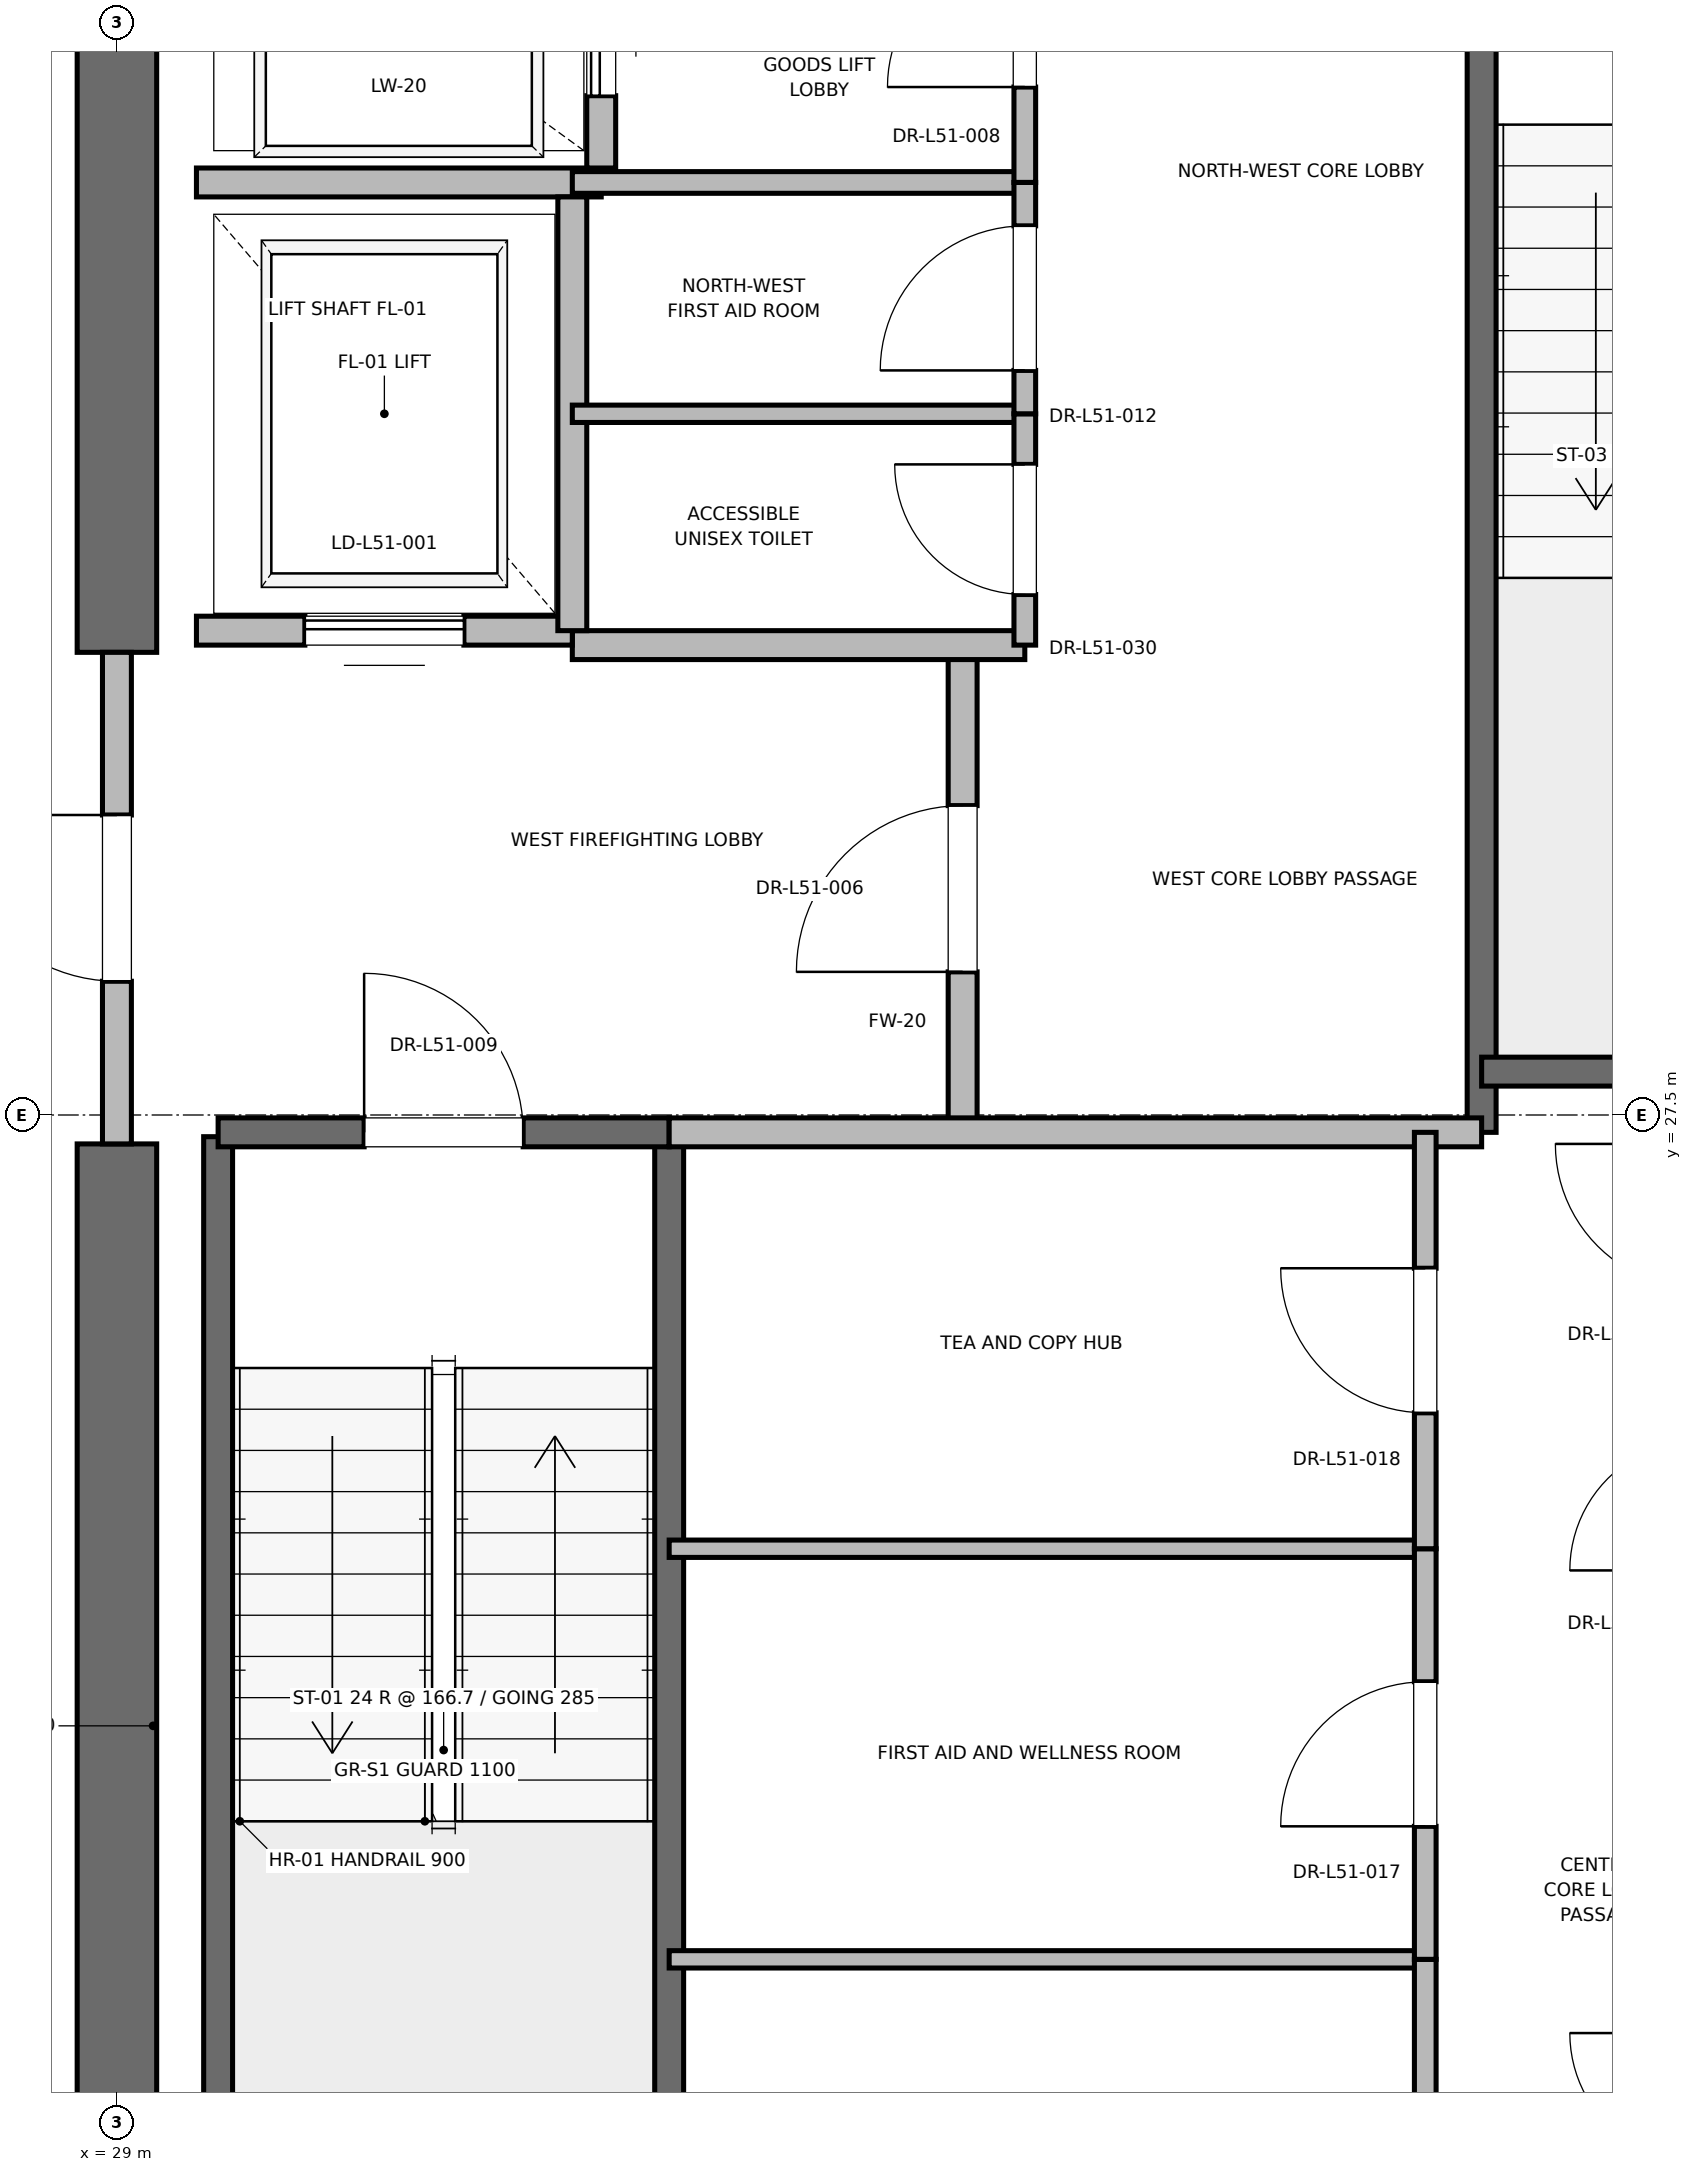
"""IFC4 building model, lengths in metres.
Left out: names, types, materials, properties, quantities, classifications, styles, units other than length and angle.
Written with IfcOpenShell. Run it as: python <this file> out.ifc"""

import sys

from ifc_helpers import new_model, si_unit, direction, frame, frame_2d, origin, place, context, subcontext, project, spatial, rectangle, extrude, element, fill, save


model = new_model("IFC4")
c1 = context("Model", 3, precision=1e-05, world=origin(), true_north=direction((0.0, 1.0)))
c2 = subcontext(c1, "Body", "Model", "MODEL_VIEW")
j1 = project(units=[si_unit("LENGTHUNIT", "METRE"), si_unit("PLANEANGLEUNIT", "RADIAN")], contexts=[c1])
p1 = place(None, origin())
s1 = spatial("IfcSite", under=j1, at=p1, CompositionType="ELEMENT")
p2 = place(p1, origin())
s2 = spatial("IfcBuilding", under=s1, at=p2, CompositionType="ELEMENT")
p3 = place(p2, frame((0.0, 0.0, 221.2)))
s3 = spatial("IfcBuildingStorey", under=s2, at=p3, CompositionType="ELEMENT", Elevation=221.2)
p4 = place(p3, frame((29.0, 18.5, 0.0), z_axis=(0.0, 0.0, 1.0), x_axis=(0.0, 1.0, 0.0)))
e1 = element("IfcWall", 1, at=p4, inside=s3, PredefinedType="SHEAR", context=c2, shape_type="SweptSolid", body=[
    extrude(rectangle(XDim=8.8, YDim=0.55, at=frame_2d((4.4, 0.0))), origin(), (0.0, 0.0, 1.0), 3.775),
])
p5 = place(p3, frame((29.0, 30.7, 0.0), z_axis=(0.0, 0.0, 1.0), x_axis=(0.0, 1.0, 0.0)))
e2 = element("IfcWall", 2, at=p5, inside=s3, PredefinedType="SHEAR", context=c2, shape_type="SweptSolid", body=[
    extrude(rectangle(XDim=5.8, YDim=0.55, at=frame_2d((2.9, 0.0))), origin(), (0.0, 0.0, 1.0), 3.775),
])
p6 = place(p3, frame((29.7, 19.2, 0.0), z_axis=(0.0, 0.0, 1.0), x_axis=(0.0, 1.0, 0.0)))
e3 = element("IfcWall", 3, at=p6, inside=s3, PredefinedType="SOLIDWALL", context=c2, shape_type="SweptSolid", body=[
    extrude(rectangle(XDim=8.15, YDim=0.2, at=frame_2d((4.075, 0.0))), origin(), (0.0, 0.0, 1.0), 3.775),
])
p7 = place(p3, frame((32.82, 18.6, 0.0), z_axis=(0.0, 0.0, 1.0), x_axis=(0.0, 1.0, 0.0)))
e4 = element("IfcWall", 4, at=p7, inside=s3, PredefinedType="SOLIDWALL", context=c2, shape_type="SweptSolid", body=[
    extrude(rectangle(XDim=8.78, YDim=0.2, at=frame_2d((4.39, 0.0))), origin(), (0.0, 0.0, 1.0), 3.775),
])
p8 = place(p3, frame((29.7, 27.38, 0.0), z_axis=(0.0, 0.0, 1.0), x_axis=(1.0, 0.0, 0.0)))
e5 = element("IfcWall", 5, at=p8, inside=s3, PredefinedType="SOLIDWALL", context=c2, shape_type="SweptSolid", body=[
    extrude(rectangle(XDim=3.12, YDim=0.2, at=frame_2d((1.56, 0.0))), origin(), (0.0, 0.0, 1.0), 3.775),
])
p9 = place(p8, frame((1.01, 0.0, 0.0)))
e6 = element("IfcOpeningElement", 6, at=p9, cuts=e5, PredefinedType="OPENING", context=c2, shape_type="SweptSolid", body=[
    extrude(rectangle(XDim=1.1, YDim=2.15, at=frame_2d((0.55, 1.075))), frame((0.0, 0.1, 0.0), z_axis=(0.0, -1.0, 0.0), x_axis=(1.0, 0.0, 0.0)), (0.0, 0.0, 1.0), 0.2),
])
p10 = place(p3, frame((38.44, 27.38, 0.0), z_axis=(0.0, 0.0, 1.0), x_axis=(0.0, 1.0, 0.0)))
e7 = element("IfcWall", 7, at=p10, inside=s3, PredefinedType="SOLIDWALL", context=c2, shape_type="SweptSolid", body=[
    extrude(rectangle(XDim=8.87, YDim=0.2, at=frame_2d((4.435, 0.0))), origin(), (0.0, 0.0, 1.0), 3.775),
])
p11 = place(p3, frame((38.44, 27.8, 0.0), z_axis=(0.0, 0.0, 1.0), x_axis=(1.0, 0.0, 0.0)))
e8 = element("IfcWall", 8, at=p11, inside=s3, PredefinedType="SOLIDWALL", context=c2, shape_type="SweptSolid", body=[
    extrude(rectangle(XDim=3.32, YDim=0.2, at=frame_2d((1.66, 0.0))), origin(), (0.0, 0.0, 1.0), 3.775),
])
p12 = place(p3, frame((34.85, 27.38, 0.0), z_axis=(0.0, 0.0, 1.0), x_axis=(0.0, 1.0, 0.0)))
e9 = element("IfcWall", 9, at=p12, inside=s3, PredefinedType="PARTITIONING", context=c2, shape_type="SweptSolid", body=[
    extrude(rectangle(XDim=3.37, YDim=0.2, at=frame_2d((1.685, 0.0))), origin(), (0.0, 0.0, 1.0), 3.775),
])
p13 = place(p12, frame((1.11, 0.0, 0.0)))
e10 = element("IfcOpeningElement", 10, at=p13, cuts=e9, PredefinedType="OPENING", context=c2, shape_type="SweptSolid", body=[
    extrude(rectangle(XDim=1.15, YDim=2.2, at=frame_2d((0.575, 1.1))), frame((0.0, 0.1, 0.0), z_axis=(0.0, -1.0, 0.0), x_axis=(1.0, 0.0, 0.0)), (0.0, 0.0, 1.0), 0.2),
])
p14 = place(p3, frame((29.0, 27.3, 0.0), z_axis=(0.0, 0.0, 1.0), x_axis=(0.0, 1.0, 0.0)))
e11 = element("IfcWall", 11, at=p14, inside=s3, PredefinedType="PARTITIONING", context=c2, shape_type="SweptSolid", body=[
    extrude(rectangle(XDim=3.4, YDim=0.2, at=frame_2d((1.7, 0.0))), origin(), (0.0, 0.0, 1.0), 2.755),
])
p15 = place(p14, frame((1.125, 0.0, 0.0)))
e12 = element("IfcOpeningElement", 12, at=p15, cuts=e11, PredefinedType="OPENING", context=c2, shape_type="SweptSolid", body=[
    extrude(rectangle(XDim=1.15, YDim=2.2, at=frame_2d((0.575, 1.1))), frame((0.0, 0.1, 0.0), z_axis=(0.0, -1.0, 0.0), x_axis=(1.0, 0.0, 0.0)), (0.0, 0.0, 1.0), 0.2),
])
p16 = place(p3, frame((32.82, 27.38, 0.0), z_axis=(0.0, 0.0, 1.0), x_axis=(1.0, 0.0, 0.0)))
e13 = element("IfcWall", 13, at=p16, inside=s3, PredefinedType="PARTITIONING", context=c2, shape_type="SweptSolid", body=[
    extrude(rectangle(XDim=5.62, YDim=0.2, at=frame_2d((2.81, 0.0))), origin(), (0.0, 0.0, 1.0), 3.775),
])
p17 = place(p3, frame((32.15, 30.75, 0.0), z_axis=(0.0, 0.0, 1.0), x_axis=(1.0, 0.0, 0.0)))
e14 = element("IfcWall", 14, at=p17, inside=s3, PredefinedType="PARTITIONING", context=c2, shape_type="SweptSolid", body=[
    extrude(rectangle(XDim=3.13, YDim=0.2, at=frame_2d((1.565, 0.0))), origin(), (0.0, 0.0, 1.0), 3.775),
])
p18 = place(p3, frame((29.55, 30.85, 0.0), z_axis=(0.0, 0.0, 1.0), x_axis=(1.0, 0.0, 0.0)))
e15 = element("IfcWall", 15, at=p18, inside=s3, PredefinedType="SOLIDWALL", context=c2, shape_type="SweptSolid", body=[
    extrude(rectangle(XDim=2.6, YDim=0.2, at=frame_2d((1.3, 0.0))), origin(), (0.0, 0.0, 1.0), 2.755),
])
p19 = place(p18, frame((0.75, 0.0, 0.0)))
e16 = element("IfcOpeningElement", 16, at=p19, cuts=e15, PredefinedType="OPENING", context=c2, shape_type="SweptSolid", body=[
    extrude(rectangle(XDim=1.1, YDim=2.2, at=frame_2d((0.55, 1.1))), frame((0.0, 0.1, 0.0), z_axis=(0.0, -1.0, 0.0), x_axis=(1.0, 0.0, 0.0)), (0.0, 0.0, 1.0), 0.2),
])
p20 = place(p3, frame((29.55, 33.95, 0.0), z_axis=(0.0, 0.0, 1.0), x_axis=(1.0, 0.0, 0.0)))
e17 = element("IfcWall", 17, at=p20, inside=s3, PredefinedType="SOLIDWALL", context=c2, shape_type="SweptSolid", body=[
    extrude(rectangle(XDim=2.8, YDim=0.2, at=frame_2d((1.4, 0.0))), origin(), (0.0, 0.0, 1.0), 3.775),
])
p21 = place(p3, frame((32.15, 30.85, 0.0), z_axis=(0.0, 0.0, 1.0), x_axis=(0.0, 1.0, 0.0)))
e18 = element("IfcWall", 18, at=p21, inside=s3, PredefinedType="SOLIDWALL", context=c2, shape_type="SweptSolid", body=[
    extrude(rectangle(XDim=3.0, YDim=0.2, at=frame_2d((1.5, 0.0))), origin(), (0.0, 0.0, 1.0), 3.775),
])
p22 = place(p3, frame((32.35, 34.05, 0.0), z_axis=(0.0, 0.0, 1.0), x_axis=(0.0, 1.0, 0.0)))
e19 = element("IfcWall", 19, at=p22, inside=s3, PredefinedType="SOLIDWALL", context=c2, shape_type="SweptSolid", body=[
    extrude(rectangle(XDim=2.1, YDim=0.2, at=frame_2d((1.05, 0.0))), origin(), (0.0, 0.0, 1.0), 3.775),
])
p23 = place(p22, frame((0.5, 0.0, 0.0)))
e20 = element("IfcOpeningElement", 20, at=p23, cuts=e19, PredefinedType="OPENING", context=c2, shape_type="SweptSolid", body=[
    extrude(rectangle(XDim=1.1, YDim=2.2, at=frame_2d((0.55, 1.1))), frame((0.0, 0.1, 0.0), z_axis=(0.0, -1.0, 0.0), x_axis=(1.0, 0.0, 0.0)), (0.0, 0.0, 1.0), 0.2),
])
p24 = place(p3, frame((32.15, 33.95, 0.0), z_axis=(0.0, 0.0, 1.0), x_axis=(1.0, 0.0, 0.0)))
e21 = element("IfcWall", 21, at=p24, inside=s3, PredefinedType="PARTITIONING", context=c2, shape_type="SweptSolid", body=[
    extrude(rectangle(XDim=3.13, YDim=0.15, at=frame_2d((1.565, 0.0))), origin(), (0.0, 0.0, 1.0), 2.85),
])
p25 = place(p3, frame((35.28, 33.95, 0.0), z_axis=(0.0, 0.0, 1.0), x_axis=(0.0, 1.0, 0.0)))
e22 = element("IfcWall", 22, at=p25, inside=s3, PredefinedType="PARTITIONING", context=c2, shape_type="SweptSolid", body=[
    extrude(rectangle(XDim=2.27, YDim=0.15, at=frame_2d((1.135, 0.0))), origin(), (0.0, 0.0, 1.0), 2.755),
])
p26 = place(p25, frame((0.66, 0.0, 0.0)))
e23 = element("IfcOpeningElement", 23, at=p26, cuts=e22, PredefinedType="OPENING", context=c2, shape_type="SweptSolid", body=[
    extrude(rectangle(XDim=0.95, YDim=2.15, at=frame_2d((0.475, 1.075))), frame((0.0, 0.075, 0.0), z_axis=(0.0, -1.0, 0.0), x_axis=(1.0, 0.0, 0.0)), (0.0, 0.0, 1.0), 0.15),
])
p27 = place(p3, frame((32.15, 32.35, 0.0), z_axis=(0.0, 0.0, 1.0), x_axis=(1.0, 0.0, 0.0)))
e24 = element("IfcWall", 24, at=p27, inside=s3, PredefinedType="PARTITIONING", context=c2, shape_type="SweptSolid", body=[
    extrude(rectangle(XDim=3.13, YDim=0.12, at=frame_2d((1.565, 0.0))), origin(), (0.0, 0.0, 1.0), 2.85),
])
p28 = place(p3, frame((35.28, 30.75, 0.0), z_axis=(0.0, 0.0, 1.0), x_axis=(0.0, 1.0, 0.0)))
e25 = element("IfcWall", 25, at=p28, inside=s3, PredefinedType="PARTITIONING", context=c2, shape_type="SweptSolid", body=[
    extrude(rectangle(XDim=1.6, YDim=0.15, at=frame_2d((0.8, 0.0))), origin(), (0.0, 0.0, 1.0), 2.85),
])
p29 = place(p28, frame((0.35, 0.0, 0.0)))
e26 = element("IfcOpeningElement", 26, at=p29, cuts=e25, PredefinedType="OPENING", context=c2, shape_type="SweptSolid", body=[
    extrude(rectangle(XDim=0.9, YDim=2.1, at=frame_2d((0.45, 1.05))), frame((0.0, 0.075, 0.0), z_axis=(0.0, -1.0, 0.0), x_axis=(1.0, 0.0, 0.0)), (0.0, 0.0, 1.0), 0.15),
])
p30 = place(p3, frame((35.28, 32.35, 0.0), z_axis=(0.0, 0.0, 1.0), x_axis=(0.0, 1.0, 0.0)))
e27 = element("IfcWall", 27, at=p30, inside=s3, PredefinedType="PARTITIONING", context=c2, shape_type="SweptSolid", body=[
    extrude(rectangle(XDim=1.6, YDim=0.15, at=frame_2d((0.8, 0.0))), origin(), (0.0, 0.0, 1.0), 2.85),
])
p31 = place(p30, frame((0.3, 0.0, 0.0)))
e28 = element("IfcOpeningElement", 28, at=p31, cuts=e27, PredefinedType="OPENING", context=c2, shape_type="SweptSolid", body=[
    extrude(rectangle(XDim=1.0, YDim=2.15, at=frame_2d((0.5, 1.075))), frame((0.0, 0.075, 0.0), z_axis=(0.0, -1.0, 0.0), x_axis=(1.0, 0.0, 0.0)), (0.0, 0.0, 1.0), 0.15),
])
for number, where, z_axis, x_axis in (
    (29, (32.82, 21.66, 0.0), (0.0, 0.0, 1.0), (1.0, 0.0, 0.0)),
    (30, (32.82, 24.5, 0.0), (0.0, 0.0, 1.0), (1.0, 0.0, 0.0)),
):
    element("IfcWall", number, at=place(p3, frame(where, z_axis=z_axis, x_axis=x_axis)), inside=s3, PredefinedType="PARTITIONING", context=c2, shape_type="SweptSolid", body=[
        extrude(rectangle(XDim=5.23, YDim=0.12, at=frame_2d((2.615, 0.0))), origin(), (0.0, 0.0, 1.0), 2.85),
    ])
p32 = place(p3, frame((38.05, 18.6, 0.0), z_axis=(0.0, 0.0, 1.0), x_axis=(0.0, 1.0, 0.0)))
e31 = element("IfcWall", 31, at=p32, inside=s3, PredefinedType="PARTITIONING", context=c2, shape_type="SweptSolid", body=[
    extrude(rectangle(XDim=3.06, YDim=0.15, at=frame_2d((1.53, 0.0))), origin(), (0.0, 0.0, 1.0), 2.755),
])
p33 = place(p32, frame((1.03, 0.0, 0.0)))
e32 = element("IfcOpeningElement", 32, at=p33, cuts=e31, PredefinedType="OPENING", context=c2, shape_type="SweptSolid", body=[
    extrude(rectangle(XDim=1.0, YDim=2.15, at=frame_2d((0.5, 1.075))), frame((0.0, 0.075, 0.0), z_axis=(0.0, -1.0, 0.0), x_axis=(1.0, 0.0, 0.0)), (0.0, 0.0, 1.0), 0.15),
])
p34 = place(p3, frame((38.05, 21.66, 0.0), z_axis=(0.0, 0.0, 1.0), x_axis=(0.0, 1.0, 0.0)))
e33 = element("IfcWall", 33, at=p34, inside=s3, PredefinedType="PARTITIONING", context=c2, shape_type="SweptSolid", body=[
    extrude(rectangle(XDim=2.84, YDim=0.15, at=frame_2d((1.42, 0.0))), origin(), (0.0, 0.0, 1.0), 2.85),
])
p35 = place(p34, frame((0.92, 0.0, 0.0)))
e34 = element("IfcOpeningElement", 34, at=p35, cuts=e33, PredefinedType="OPENING", context=c2, shape_type="SweptSolid", body=[
    extrude(rectangle(XDim=1.0, YDim=2.15, at=frame_2d((0.5, 1.075))), frame((0.0, 0.075, 0.0), z_axis=(0.0, -1.0, 0.0), x_axis=(1.0, 0.0, 0.0)), (0.0, 0.0, 1.0), 0.15),
])
p36 = place(p3, frame((38.05, 24.5, 0.0), z_axis=(0.0, 0.0, 1.0), x_axis=(0.0, 1.0, 0.0)))
e35 = element("IfcWall", 35, at=p36, inside=s3, PredefinedType="PARTITIONING", context=c2, shape_type="SweptSolid", body=[
    extrude(rectangle(XDim=2.88, YDim=0.15, at=frame_2d((1.44, 0.0))), origin(), (0.0, 0.0, 1.0), 2.85),
])
p37 = place(p36, frame((0.94, 0.0, 0.0)))
e36 = element("IfcOpeningElement", 36, at=p37, cuts=e35, PredefinedType="OPENING", context=c2, shape_type="SweptSolid", body=[
    extrude(rectangle(XDim=1.0, YDim=2.15, at=frame_2d((0.5, 1.075))), frame((0.0, 0.075, 0.0), z_axis=(0.0, -1.0, 0.0), x_axis=(1.0, 0.0, 0.0)), (0.0, 0.0, 1.0), 0.15),
])
p38 = place(p9, origin())
e37 = element("IfcDoor", 37, at=p38, inside=s3, OperationType="SINGLE_SWING_LEFT", PredefinedType="DOOR", context=c2, shape_type="SweptSolid", body=[
    extrude(rectangle(XDim=1.1, YDim=2.15, at=frame_2d((0.55, 1.075))), frame((0.0, 0.025, 0.0), z_axis=(0.0, -1.0, 0.0), x_axis=(1.0, 0.0, 0.0)), (0.0, 0.0, 1.0), 0.05),
])
fill(e6, e37)
p39 = place(p13, origin())
e38 = element("IfcDoor", 38, at=p39, inside=s3, OperationType="SINGLE_SWING_LEFT", PredefinedType="DOOR", context=c2, shape_type="SweptSolid", body=[
    extrude(rectangle(XDim=1.15, YDim=2.2, at=frame_2d((0.575, 1.1))), frame((0.0, 0.025, 0.0), z_axis=(0.0, -1.0, 0.0), x_axis=(1.0, 0.0, 0.0)), (0.0, 0.0, 1.0), 0.05),
])
fill(e10, e38)
p40 = place(p15, origin())
e39 = element("IfcDoor", 39, at=p40, inside=s3, OperationType="SINGLE_SWING_RIGHT", PredefinedType="DOOR", context=c2, shape_type="SweptSolid", body=[
    extrude(rectangle(XDim=1.15, YDim=2.2, at=frame_2d((0.575, 1.1))), frame((0.0, 0.025, 0.0), z_axis=(0.0, -1.0, 0.0), x_axis=(1.0, 0.0, 0.0)), (0.0, 0.0, 1.0), 0.05),
])
fill(e12, e39)
p41 = place(p19, origin())
e40 = element("IfcDoor", 40, at=p41, inside=s3, OperationType="SLIDING_TO_RIGHT", PredefinedType="DOOR", context=c2, shape_type="SweptSolid", body=[
    extrude(rectangle(XDim=1.1, YDim=2.2, at=frame_2d((0.55, 1.1))), frame((0.0, 0.025, 0.0), z_axis=(0.0, -1.0, 0.0), x_axis=(1.0, 0.0, 0.0)), (0.0, 0.0, 1.0), 0.05),
])
fill(e16, e40)
p42 = place(p23, origin())
e41 = element("IfcDoor", 41, at=p42, inside=s3, OperationType="SLIDING_TO_RIGHT", PredefinedType="DOOR", context=c2, shape_type="SweptSolid", body=[
    extrude(rectangle(XDim=1.1, YDim=2.2, at=frame_2d((0.55, 1.1))), frame((0.0, 0.025, 0.0), z_axis=(0.0, -1.0, 0.0), x_axis=(1.0, 0.0, 0.0)), (0.0, 0.0, 1.0), 0.05),
])
fill(e20, e41)
p43 = place(p26, origin())
e42 = element("IfcDoor", 42, at=p43, inside=s3, OperationType="SINGLE_SWING_LEFT", PredefinedType="DOOR", context=c2, shape_type="SweptSolid", body=[
    extrude(rectangle(XDim=0.95, YDim=2.15, at=frame_2d((0.475, 1.075))), frame((0.0, 0.025, 0.0), z_axis=(0.0, -1.0, 0.0), x_axis=(1.0, 0.0, 0.0)), (0.0, 0.0, 1.0), 0.05),
])
fill(e23, e42)
p44 = place(p29, origin())
e43 = element("IfcDoor", 43, at=p44, inside=s3, OperationType="SINGLE_SWING_RIGHT", PredefinedType="DOOR", context=c2, shape_type="SweptSolid", body=[
    extrude(rectangle(XDim=0.9, YDim=2.1, at=frame_2d((0.45, 1.05))), frame((0.0, 0.025, 0.0), z_axis=(0.0, -1.0, 0.0), x_axis=(1.0, 0.0, 0.0)), (0.0, 0.0, 1.0), 0.05),
])
fill(e26, e43)
p45 = place(p31, origin())
e44 = element("IfcDoor", 44, at=p45, inside=s3, OperationType="SINGLE_SWING_LEFT", PredefinedType="DOOR", context=c2, shape_type="SweptSolid", body=[
    extrude(rectangle(XDim=1.0, YDim=2.15, at=frame_2d((0.5, 1.075))), frame((0.0, 0.025, 0.0), z_axis=(0.0, -1.0, 0.0), x_axis=(1.0, 0.0, 0.0)), (0.0, 0.0, 1.0), 0.05),
])
fill(e28, e44)
p46 = place(p35, origin())
e45 = element("IfcDoor", 45, at=p46, inside=s3, OperationType="SINGLE_SWING_LEFT", PredefinedType="DOOR", context=c2, shape_type="SweptSolid", body=[
    extrude(rectangle(XDim=1.0, YDim=2.15, at=frame_2d((0.5, 1.075))), frame((0.0, 0.025, 0.0), z_axis=(0.0, -1.0, 0.0), x_axis=(1.0, 0.0, 0.0)), (0.0, 0.0, 1.0), 0.05),
])
fill(e34, e45)
p47 = place(p37, origin())
e46 = element("IfcDoor", 46, at=p47, inside=s3, OperationType="SINGLE_SWING_RIGHT", PredefinedType="DOOR", context=c2, shape_type="SweptSolid", body=[
    extrude(rectangle(XDim=1.0, YDim=2.15, at=frame_2d((0.5, 1.075))), frame((0.0, 0.025, 0.0), z_axis=(0.0, -1.0, 0.0), x_axis=(1.0, 0.0, 0.0)), (0.0, 0.0, 1.0), 0.05),
])
fill(e36, e46)
save(model, sys.argv[1])
